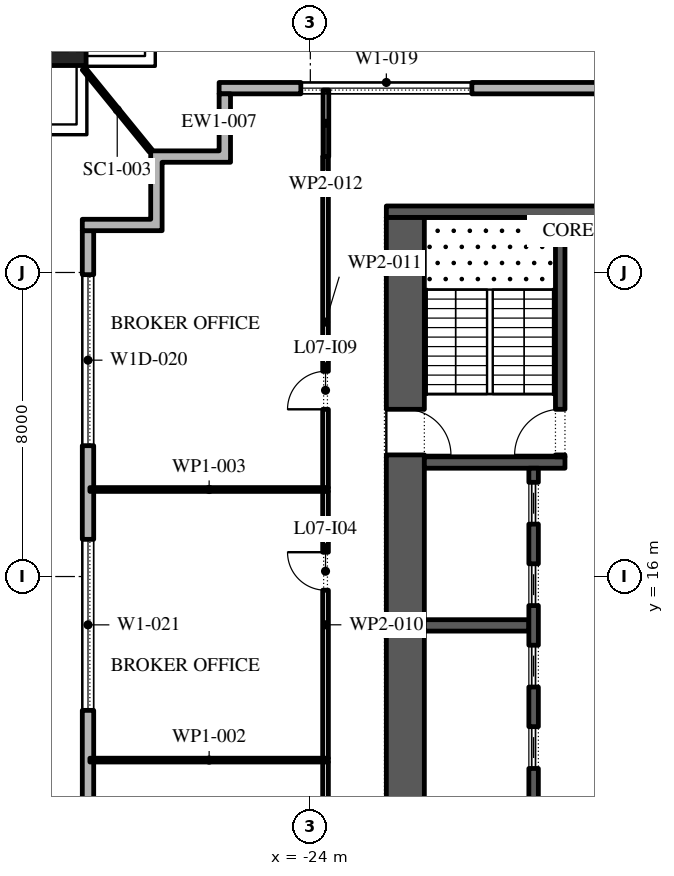
"""IFC4 building model, lengths in metres.
Left out: names, types, materials, properties, quantities, classifications, styles, units other than length and angle.
Written with IfcOpenShell. Run it as: python <this file> out.ifc"""

import sys

from ifc_helpers import new_model, si_unit, direction, frame, frame_2d, origin, origin_2d, place, context, subcontext, project, spatial, polyline, rectangle, outline, extrude, element, fill, save


model = new_model("IFC4")
c1 = context("Model", 3, precision=1e-05, world=origin(), true_north=direction((0.0, 1.0)))
c2 = subcontext(c1, "Body", "Model", "MODEL_VIEW")
j1 = project(units=[si_unit("LENGTHUNIT", "METRE"), si_unit("PLANEANGLEUNIT", "RADIAN")], contexts=[c1])
p1 = place(None, origin())
s1 = spatial("IfcSite", under=j1, at=p1, CompositionType="ELEMENT")
p2 = place(p1, origin())
s2 = spatial("IfcBuilding", under=s1, at=p2, CompositionType="ELEMENT")
p3 = place(p2, frame((0.0, 0.0, 39.6)))
s3 = spatial("IfcBuildingStorey", under=s2, at=p3, CompositionType="ELEMENT", Elevation=39.6)
p4 = place(p3, frame((-30.6, 30.146, 0.0), z_axis=(0.0, 0.090540965689, 0.995892731941), x_axis=(-1.0, 0.0, 0.0)))
e1 = element("IfcColumn", 1, at=p4, inside=s3, PredefinedType="COLUMN", context=c2, shape_type="SweptSolid", body=[
    extrude(rectangle(XDim=1.4, YDim=1.4, at=origin_2d()), origin(), (0.0, 0.0, 1.0), 4.217),
])
p5 = place(p3, frame((26.1, 28.85, 0.0), z_axis=(0.0, 0.0, 1.0), x_axis=(-1.0, 0.0, 0.0)))
e2 = element("IfcWall", 2, at=p5, inside=s3, PredefinedType="STANDARD", context=c2, shape_type="SweptSolid", body=[
    extrude(rectangle(XDim=52.5, YDim=0.3, at=frame_2d((26.25, 0.0))), origin(), (0.0, 0.0, 1.0), 4.0),
])
p6 = place(p5, frame((2.0, 0.0, 0.45)))
e3 = element("IfcOpeningElement", 3, at=p6, cuts=e2, PredefinedType="OPENING", context=c2, shape_type="SweptSolid", body=[
    extrude(rectangle(XDim=4.5, YDim=3.05, at=frame_2d((2.25, 1.525))), frame((0.0, 0.16, 0.0), z_axis=(0.0, -1.0, 0.0), x_axis=(1.0, 0.0, 0.0)), (0.0, 0.0, 1.0), 0.32),
])
p7 = place(p5, frame((10.65, 0.0, 0.45)))
e4 = element("IfcOpeningElement", 4, at=p7, cuts=e2, PredefinedType="OPENING", context=c2, shape_type="SweptSolid", body=[
    extrude(rectangle(XDim=4.5, YDim=3.05, at=frame_2d((2.25, 1.525))), frame((0.0, 0.16, 0.0), z_axis=(0.0, -1.0, 0.0), x_axis=(1.0, 0.0, 0.0)), (0.0, 0.0, 1.0), 0.32),
])
p8 = place(p5, frame((20.5, 0.0, 0.0)))
e5 = element("IfcOpeningElement", 5, at=p8, cuts=e2, PredefinedType="OPENING", context=c2, shape_type="SweptSolid", body=[
    extrude(rectangle(XDim=2.4, YDim=3.5, at=frame_2d((1.2, 1.75))), frame((0.0, 0.16, 0.0), z_axis=(0.0, -1.0, 0.0), x_axis=(1.0, 0.0, 0.0)), (0.0, 0.0, 1.0), 0.32),
])
p9 = place(p5, frame((28.25, 0.0, 0.45)))
e6 = element("IfcOpeningElement", 6, at=p9, cuts=e2, PredefinedType="OPENING", context=c2, shape_type="SweptSolid", body=[
    extrude(rectangle(XDim=4.5, YDim=3.05, at=frame_2d((2.25, 1.525))), frame((0.0, 0.16, 0.0), z_axis=(0.0, -1.0, 0.0), x_axis=(1.0, 0.0, 0.0)), (0.0, 0.0, 1.0), 0.32),
])
p10 = place(p5, frame((37.05, 0.0, 0.45)))
e7 = element("IfcOpeningElement", 7, at=p10, cuts=e2, PredefinedType="OPENING", context=c2, shape_type="SweptSolid", body=[
    extrude(rectangle(XDim=4.5, YDim=3.05, at=frame_2d((2.25, 1.525))), frame((0.0, 0.16, 0.0), z_axis=(0.0, -1.0, 0.0), x_axis=(1.0, 0.0, 0.0)), (0.0, 0.0, 1.0), 0.32),
])
p11 = place(p5, frame((45.85, 0.0, 0.45)))
e8 = element("IfcOpeningElement", 8, at=p11, cuts=e2, PredefinedType="OPENING", context=c2, shape_type="SweptSolid", body=[
    extrude(rectangle(XDim=4.5, YDim=3.05, at=frame_2d((2.25, 1.525))), frame((0.0, 0.16, 0.0), z_axis=(0.0, -1.0, 0.0), x_axis=(1.0, 0.0, 0.0)), (0.0, 0.0, 1.0), 0.32),
])
p12 = place(p3, frame((-29.85, 25.1, 0.0), z_axis=(0.0, 0.0, 1.0), x_axis=(0.0, -1.0, 0.0)))
e9 = element("IfcWall", 9, at=p12, inside=s3, PredefinedType="STANDARD", context=c2, shape_type="SweptSolid", body=[
    extrude(rectangle(XDim=49.5, YDim=0.3, at=frame_2d((24.75, 0.0))), origin(), (0.0, 0.0, 1.0), 4.0),
])
p13 = place(p12, frame((1.157, 0.0, 0.45)))
e10 = element("IfcOpeningElement", 10, at=p13, cuts=e9, PredefinedType="OPENING", context=c2, shape_type="SweptSolid", body=[
    extrude(rectangle(XDim=4.5, YDim=2.875, at=frame_2d((2.25, 1.438))), frame((0.0, 0.16, 0.0), z_axis=(0.0, -1.0, 0.0), x_axis=(1.0, 0.0, 0.0)), (0.0, 0.0, 1.0), 0.32),
])
p14 = place(p12, frame((8.121, 0.0, 0.45)))
e11 = element("IfcOpeningElement", 11, at=p14, cuts=e9, PredefinedType="OPENING", context=c2, shape_type="SweptSolid", body=[
    extrude(rectangle(XDim=4.5, YDim=3.05, at=frame_2d((2.25, 1.525))), frame((0.0, 0.16, 0.0), z_axis=(0.0, -1.0, 0.0), x_axis=(1.0, 0.0, 0.0)), (0.0, 0.0, 1.0), 0.32),
])
p15 = place(p12, frame((16.286, 0.0, 0.0)))
e12 = element("IfcOpeningElement", 12, at=p15, cuts=e9, PredefinedType="OPENING", context=c2, shape_type="SweptSolid", body=[
    extrude(rectangle(XDim=2.4, YDim=3.325, at=frame_2d((1.2, 1.663))), frame((0.0, 0.16, 0.0), z_axis=(0.0, -1.0, 0.0), x_axis=(1.0, 0.0, 0.0)), (0.0, 0.0, 1.0), 0.32),
])
p16 = place(p12, frame((22.35, 0.0, 0.45)))
e13 = element("IfcOpeningElement", 13, at=p16, cuts=e9, PredefinedType="OPENING", context=c2, shape_type="SweptSolid", body=[
    extrude(rectangle(XDim=4.5, YDim=2.875, at=frame_2d((2.25, 1.438))), frame((0.0, 0.16, 0.0), z_axis=(0.0, -1.0, 0.0), x_axis=(1.0, 0.0, 0.0)), (0.0, 0.0, 1.0), 0.32),
])
p17 = place(p12, frame((29.464, 0.0, 0.45)))
e14 = element("IfcOpeningElement", 14, at=p17, cuts=e9, PredefinedType="OPENING", context=c2, shape_type="SweptSolid", body=[
    extrude(rectangle(XDim=4.5, YDim=2.875, at=frame_2d((2.25, 1.438))), frame((0.0, 0.16, 0.0), z_axis=(0.0, -1.0, 0.0), x_axis=(1.0, 0.0, 0.0)), (0.0, 0.0, 1.0), 0.32),
])
p18 = place(p12, frame((36.579, 0.0, 0.45)))
e15 = element("IfcOpeningElement", 15, at=p18, cuts=e9, PredefinedType="OPENING", context=c2, shape_type="SweptSolid", body=[
    extrude(rectangle(XDim=4.5, YDim=2.825, at=frame_2d((2.25, 1.413))), frame((0.0, 0.16, 0.0), z_axis=(0.0, -1.0, 0.0), x_axis=(1.0, 0.0, 0.0)), (0.0, 0.0, 1.0), 0.32),
])
p19 = place(p12, frame((44.743, 0.0, 0.0)))
e16 = element("IfcOpeningElement", 16, at=p19, cuts=e9, PredefinedType="OPENING", context=c2, shape_type="SweptSolid", body=[
    extrude(rectangle(XDim=2.4, YDim=3.5, at=frame_2d((1.2, 1.75))), frame((0.0, 0.16, 0.0), z_axis=(0.0, -1.0, 0.0), x_axis=(1.0, 0.0, 0.0)), (0.0, 0.0, 1.0), 0.32),
])
p20 = place(p3, origin())
e17 = element("IfcWall", 17, at=p20, inside=s3, PredefinedType="STANDARD", context=c2, shape_type="SweptSolid", body=[
    extrude(outline(polyline([(-28.2, 25.4), (-28.2, 27.2), (-26.4, 27.2), (-26.4, 28.7), (-26.1, 28.7), (-26.1, 26.9), (-27.9, 26.9), (-27.9, 25.1), (-30.0, 25.1), (-30.0, 25.4), (-28.2, 25.4)])), origin(), (0.0, 0.0, 1.0), 4.0),
])
p21 = place(p3, frame((-28.2, 27.2, -0.05), z_axis=(0.0, 0.0, 1.0), x_axis=(-0.631639832541, 0.775261969883, 0.0)))
e18 = element("IfcWall", 18, at=p21, inside=s3, PredefinedType="STANDARD", context=c2, shape_type="SweptSolid", body=[
    extrude(rectangle(XDim=2.79, YDim=0.1, at=frame_2d((1.395, 0.0))), origin(), (0.0, 0.0, 1.0), 4.05),
])
p22 = place(p3, frame((-21.5, -2.45, 0.0), z_axis=(0.0, 0.0, 1.0), x_axis=(0.0, 1.0, 0.0)))
e19 = element("IfcWall", 19, at=p22, inside=s3, PredefinedType="SHEAR", context=c2, shape_type="SweptSolid", body=[
    extrude(rectangle(XDim=27.9, YDim=1.0, at=frame_2d((13.95, 0.0))), origin(), (0.0, 0.0, 1.0), 4.0),
])
p23 = place(p22, frame((5.05, 0.0, 0.0)))
e20 = element("IfcOpeningElement", 20, at=p23, cuts=e19, PredefinedType="OPENING", context=c2, shape_type="SweptSolid", body=[
    extrude(rectangle(XDim=1.2, YDim=2.1, at=frame_2d((0.6, 1.05))), frame((0.0, 0.51, 0.0), z_axis=(0.0, -1.0, 0.0), x_axis=(1.0, 0.0, 0.0)), (0.0, 0.0, 1.0), 1.02),
])
p24 = place(p22, frame((21.65, 0.0, 0.0)))
e21 = element("IfcOpeningElement", 21, at=p24, cuts=e19, PredefinedType="OPENING", context=c2, shape_type="SweptSolid", body=[
    extrude(rectangle(XDim=1.2, YDim=2.1, at=frame_2d((0.6, 1.05))), frame((0.0, 0.51, 0.0), z_axis=(0.0, -1.0, 0.0), x_axis=(1.0, 0.0, 0.0)), (0.0, 0.0, 1.0), 1.02),
])
p25 = place(p3, frame((-22.0, 25.6, 0.0), z_axis=(0.0, 0.0, 1.0), x_axis=(1.0, 0.0, 0.0)))
e22 = element("IfcWall", 22, at=p25, inside=s3, PredefinedType="SHEAR", context=c2, shape_type="SweptSolid", body=[
    extrude(rectangle(XDim=12.0, YDim=0.3, at=frame_2d((6.0, 0.0))), origin(), (0.0, 0.0, 1.0), 4.0),
])
p26 = place(p3, frame((-21.0, 19.0, 0.0), z_axis=(0.0, 0.0, 1.0), x_axis=(1.0, 0.0, 0.0)))
e23 = element("IfcWall", 23, at=p26, inside=s3, PredefinedType="SHEAR", context=c2, shape_type="SweptSolid", body=[
    extrude(rectangle(XDim=3.7, YDim=0.3, at=frame_2d((1.85, 0.0))), origin(), (0.0, 0.0, 1.0), 4.0),
])
p27 = place(p3, frame((-17.425, 19.15, 0.0), z_axis=(0.0, 0.0, 1.0), x_axis=(0.0, 1.0, 0.0)))
e24 = element("IfcWall", 24, at=p27, inside=s3, PredefinedType="SHEAR", context=c2, shape_type="SweptSolid", body=[
    extrude(rectangle(XDim=6.3, YDim=0.25, at=frame_2d((3.15, 0.0))), origin(), (0.0, 0.0, 1.0), 4.0),
])
p28 = place(p27, frame((0.05, 0.0, 0.0)))
e25 = element("IfcOpeningElement", 25, at=p28, cuts=e24, PredefinedType="OPENING", context=c2, shape_type="SweptSolid", body=[
    extrude(rectangle(XDim=1.2, YDim=2.1, at=frame_2d((0.6, 1.05))), frame((0.0, 0.135, 0.0), z_axis=(0.0, -1.0, 0.0), x_axis=(1.0, 0.0, 0.0)), (0.0, 0.0, 1.0), 0.27),
])
p29 = place(p3, frame((-21.0, 14.714, 0.0), z_axis=(0.0, 0.0, 1.0), x_axis=(1.0, 0.0, 0.0)))
e26 = element("IfcWall", 26, at=p29, inside=s3, PredefinedType="SHEAR", context=c2, shape_type="SweptSolid", body=[
    extrude(rectangle(XDim=2.75, YDim=0.3, at=frame_2d((1.375, 0.0))), origin(), (0.0, 0.0, 1.0), 4.0),
])
p30 = place(p3, frame((-18.125, 4.15, 0.0), z_axis=(0.0, 0.0, 1.0), x_axis=(0.0, 1.0, 0.0)))
e27 = element("IfcWall", 27, at=p30, inside=s3, PredefinedType="SHEAR", context=c2, shape_type="SweptSolid", body=[
    extrude(rectangle(XDim=14.7, YDim=0.25, at=frame_2d((7.35, 0.0))), origin(), (0.0, 0.0, 1.0), 4.0),
])
p31 = place(p30, frame((0.371, 0.0, 0.0)))
e28 = element("IfcOpeningElement", 28, at=p31, cuts=e27, PredefinedType="OPENING", context=c2, shape_type="SweptSolid", body=[
    extrude(rectangle(XDim=1.1, YDim=2.1, at=frame_2d((0.55, 1.05))), frame((0.0, 0.135, 0.0), z_axis=(0.0, -1.0, 0.0), x_axis=(1.0, 0.0, 0.0)), (0.0, 0.0, 1.0), 0.27),
])
p32 = place(p30, frame((2.514, 0.0, 0.0)))
e29 = element("IfcOpeningElement", 29, at=p32, cuts=e27, PredefinedType="OPENING", context=c2, shape_type="SweptSolid", body=[
    extrude(rectangle(XDim=1.1, YDim=2.1, at=frame_2d((0.55, 1.05))), frame((0.0, 0.135, 0.0), z_axis=(0.0, -1.0, 0.0), x_axis=(1.0, 0.0, 0.0)), (0.0, 0.0, 1.0), 0.27),
])
p33 = place(p30, frame((4.657, 0.0, 0.0)))
e30 = element("IfcOpeningElement", 30, at=p33, cuts=e27, PredefinedType="OPENING", context=c2, shape_type="SweptSolid", body=[
    extrude(rectangle(XDim=1.1, YDim=2.1, at=frame_2d((0.55, 1.05))), frame((0.0, 0.135, 0.0), z_axis=(0.0, -1.0, 0.0), x_axis=(1.0, 0.0, 0.0)), (0.0, 0.0, 1.0), 0.27),
])
p34 = place(p30, frame((6.8, 0.0, 0.0)))
e31 = element("IfcOpeningElement", 31, at=p34, cuts=e27, PredefinedType="OPENING", context=c2, shape_type="SweptSolid", body=[
    extrude(rectangle(XDim=1.1, YDim=2.1, at=frame_2d((0.55, 1.05))), frame((0.0, 0.135, 0.0), z_axis=(0.0, -1.0, 0.0), x_axis=(1.0, 0.0, 0.0)), (0.0, 0.0, 1.0), 0.27),
])
p35 = place(p30, frame((8.943, 0.0, 0.0)))
e32 = element("IfcOpeningElement", 32, at=p35, cuts=e27, PredefinedType="OPENING", context=c2, shape_type="SweptSolid", body=[
    extrude(rectangle(XDim=1.1, YDim=2.1, at=frame_2d((0.55, 1.05))), frame((0.0, 0.135, 0.0), z_axis=(0.0, -1.0, 0.0), x_axis=(1.0, 0.0, 0.0)), (0.0, 0.0, 1.0), 0.27),
])
p36 = place(p30, frame((11.086, 0.0, 0.0)))
e33 = element("IfcOpeningElement", 33, at=p36, cuts=e27, PredefinedType="OPENING", context=c2, shape_type="SweptSolid", body=[
    extrude(rectangle(XDim=1.1, YDim=2.1, at=frame_2d((0.55, 1.05))), frame((0.0, 0.135, 0.0), z_axis=(0.0, -1.0, 0.0), x_axis=(1.0, 0.0, 0.0)), (0.0, 0.0, 1.0), 0.27),
])
p37 = place(p30, frame((13.229, 0.0, 0.0)))
e34 = element("IfcOpeningElement", 34, at=p37, cuts=e27, PredefinedType="OPENING", context=c2, shape_type="SweptSolid", body=[
    extrude(rectangle(XDim=1.1, YDim=2.1, at=frame_2d((0.55, 1.05))), frame((0.0, 0.135, 0.0), z_axis=(0.0, -1.0, 0.0), x_axis=(1.0, 0.0, 0.0)), (0.0, 0.0, 1.0), 0.27),
])
for number, where, z_axis, x_axis in (
    (35, (-29.8, 11.17, 0.0), (0.0, 0.0, 1.0), (1.0, 0.0, 0.0)),
    (36, (-29.8, 18.29, 0.0), (0.0, 0.0, 1.0), (1.0, 0.0, 0.0)),
):
    element("IfcWall", number, at=place(p3, frame(where, z_axis=z_axis, x_axis=x_axis)), inside=s3, PredefinedType="PARTITIONING", context=c2, shape_type="SweptSolid", body=[
        extrude(rectangle(XDim=6.275, YDim=0.1, at=frame_2d((3.138, 0.0))), origin(), (0.0, 0.0, 1.0), 4.0),
    ])
p38 = place(p3, frame((-23.6, -3.01, 0.0), z_axis=(0.0, 0.0, 1.0), x_axis=(0.0, 1.0, 0.0)))
e37 = element("IfcWall", 37, at=p38, inside=s3, PredefinedType="PARTITIONING", context=c2, shape_type="SweptSolid", body=[
    extrude(rectangle(XDim=14.13, YDim=0.15, at=frame_2d((7.065, 0.0))), origin(), (0.0, 0.0, 1.0), 4.0),
])
p39 = place(p38, frame((6.53, 0.0, 0.0)))
e38 = element("IfcOpeningElement", 38, at=p39, cuts=e37, PredefinedType="OPENING", context=c2, shape_type="SweptSolid", body=[
    extrude(rectangle(XDim=1.0, YDim=2.1, at=frame_2d((0.5, 1.05))), frame((0.0, 0.085, 0.0), z_axis=(0.0, -1.0, 0.0), x_axis=(1.0, 0.0, 0.0)), (0.0, 0.0, 1.0), 0.17),
])
p40 = place(p3, frame((-23.6, 11.22, 0.0), z_axis=(0.0, 0.0, 1.0), x_axis=(0.0, 1.0, 0.0)))
e39 = element("IfcWall", 39, at=p40, inside=s3, PredefinedType="PARTITIONING", context=c2, shape_type="SweptSolid", body=[
    extrude(rectangle(XDim=7.02, YDim=0.15, at=frame_2d((3.51, 0.0))), origin(), (0.0, 0.0, 1.0), 4.0),
])
p41 = place(p40, frame((4.42, 0.0, 0.0)))
e40 = element("IfcOpeningElement", 40, at=p41, cuts=e39, PredefinedType="OPENING", context=c2, shape_type="SweptSolid", body=[
    extrude(rectangle(XDim=1.0, YDim=2.1, at=frame_2d((0.5, 1.05))), frame((0.0, 0.085, 0.0), z_axis=(0.0, -1.0, 0.0), x_axis=(1.0, 0.0, 0.0)), (0.0, 0.0, 1.0), 0.17),
])
p42 = place(p3, frame((-23.6, 18.34, 0.0), z_axis=(0.0, 0.0, 1.0), x_axis=(0.0, 1.0, 0.0)))
e41 = element("IfcWall", 41, at=p42, inside=s3, PredefinedType="PARTITIONING", context=c2, shape_type="SweptSolid", body=[
    extrude(rectangle(XDim=8.71, YDim=0.15, at=frame_2d((4.355, 0.0))), origin(), (0.0, 0.0, 1.0), 4.0),
])
p43 = place(p42, frame((2.06, 0.0, 0.0)))
e42 = element("IfcOpeningElement", 42, at=p43, cuts=e41, PredefinedType="OPENING", context=c2, shape_type="SweptSolid", body=[
    extrude(rectangle(XDim=1.0, YDim=2.1, at=frame_2d((0.5, 1.05))), frame((0.0, 0.085, 0.0), z_axis=(0.0, -1.0, 0.0), x_axis=(1.0, 0.0, 0.0)), (0.0, 0.0, 1.0), 0.17),
])
p44 = place(p3, frame((-23.59, 27.05, 0.0), z_axis=(0.0, 0.0, 1.0), x_axis=(0.0, 1.0, 0.0)))
e43 = element("IfcWall", 43, at=p44, inside=s3, PredefinedType="PARTITIONING", context=c2, shape_type="SweptSolid", body=[
    extrude(rectangle(XDim=1.75, YDim=0.15, at=frame_2d((0.875, 0.0))), origin(), (0.0, 0.0, 1.0), 4.0),
])
p45 = place(p11, origin())
e44 = element("IfcWindow", 44, at=p45, inside=s3, PartitioningType="DOUBLE_PANEL_VERTICAL", PredefinedType="WINDOW", context=c2, shape_type="SweptSolid", body=[
    extrude(rectangle(XDim=4.5, YDim=3.05, at=frame_2d((2.25, 1.525))), frame((0.0, 0.03, 0.0), z_axis=(0.0, -1.0, 0.0), x_axis=(1.0, 0.0, 0.0)), (0.0, 0.0, 1.0), 0.06),
])
fill(e8, e44)
p46 = place(p13, origin())
e45 = element("IfcWindow", 45, at=p46, inside=s3, PartitioningType="DOUBLE_PANEL_VERTICAL", PredefinedType="WINDOW", context=c2, shape_type="SweptSolid", body=[
    extrude(rectangle(XDim=4.5, YDim=2.875, at=frame_2d((2.25, 1.438))), frame((0.0, 0.03, 0.0), z_axis=(0.0, -1.0, 0.0), x_axis=(1.0, 0.0, 0.0)), (0.0, 0.0, 1.0), 0.06),
])
fill(e10, e45)
p47 = place(p14, origin())
e46 = element("IfcWindow", 46, at=p47, inside=s3, PartitioningType="DOUBLE_PANEL_VERTICAL", PredefinedType="WINDOW", context=c2, shape_type="SweptSolid", body=[
    extrude(rectangle(XDim=4.5, YDim=3.05, at=frame_2d((2.25, 1.525))), frame((0.0, 0.03, 0.0), z_axis=(0.0, -1.0, 0.0), x_axis=(1.0, 0.0, 0.0)), (0.0, 0.0, 1.0), 0.06),
])
fill(e11, e46)
p48 = place(p34, origin())
e47 = element("IfcDoor", 47, at=p48, inside=s3, OperationType="SLIDING_TO_LEFT", PredefinedType="DOOR", context=c2, shape_type="SweptSolid", body=[
    extrude(rectangle(XDim=1.1, YDim=2.1, at=frame_2d((0.55, 1.05))), frame((0.0, 0.025, 0.0), z_axis=(0.0, -1.0, 0.0), x_axis=(1.0, 0.0, 0.0)), (0.0, 0.0, 1.0), 0.05),
])
fill(e31, e47)
p49 = place(p35, origin())
e48 = element("IfcDoor", 48, at=p49, inside=s3, OperationType="SLIDING_TO_LEFT", PredefinedType="DOOR", context=c2, shape_type="SweptSolid", body=[
    extrude(rectangle(XDim=1.1, YDim=2.1, at=frame_2d((0.55, 1.05))), frame((0.0, 0.025, 0.0), z_axis=(0.0, -1.0, 0.0), x_axis=(1.0, 0.0, 0.0)), (0.0, 0.0, 1.0), 0.05),
])
fill(e32, e48)
p50 = place(p36, origin())
e49 = element("IfcDoor", 49, at=p50, inside=s3, OperationType="SLIDING_TO_LEFT", PredefinedType="DOOR", context=c2, shape_type="SweptSolid", body=[
    extrude(rectangle(XDim=1.1, YDim=2.1, at=frame_2d((0.55, 1.05))), frame((0.0, 0.025, 0.0), z_axis=(0.0, -1.0, 0.0), x_axis=(1.0, 0.0, 0.0)), (0.0, 0.0, 1.0), 0.05),
])
fill(e33, e49)
p51 = place(p37, origin())
e50 = element("IfcDoor", 50, at=p51, inside=s3, OperationType="SLIDING_TO_LEFT", PredefinedType="DOOR", context=c2, shape_type="SweptSolid", body=[
    extrude(rectangle(XDim=1.1, YDim=2.1, at=frame_2d((0.55, 1.05))), frame((0.0, 0.025, 0.0), z_axis=(0.0, -1.0, 0.0), x_axis=(1.0, 0.0, 0.0)), (0.0, 0.0, 1.0), 0.05),
])
fill(e34, e50)
p52 = place(p28, origin())
e51 = element("IfcDoor", 51, at=p52, inside=s3, OperationType="SINGLE_SWING_RIGHT", PredefinedType="DOOR", context=c2, shape_type="SweptSolid", body=[
    extrude(rectangle(XDim=1.2, YDim=2.1, at=frame_2d((0.6, 1.05))), frame((0.0, 0.025, 0.0), z_axis=(0.0, -1.0, 0.0), x_axis=(1.0, 0.0, 0.0)), (0.0, 0.0, 1.0), 0.05),
])
fill(e25, e51)
p53 = place(p24, frame((1.2, 0.0, 0.0), z_axis=(0.0, 0.0, 1.0), x_axis=(-1.0, 0.0, 0.0)))
e52 = element("IfcDoor", 52, at=p53, inside=s3, OperationType="SINGLE_SWING_LEFT", PredefinedType="DOOR", context=c2, shape_type="SweptSolid", body=[
    extrude(rectangle(XDim=1.2, YDim=2.1, at=frame_2d((0.6, 1.05))), frame((0.0, 0.025, 0.0), z_axis=(0.0, -1.0, 0.0), x_axis=(1.0, 0.0, 0.0)), (0.0, 0.0, 1.0), 0.05),
])
fill(e21, e52)
p54 = place(p41, origin())
e53 = element("IfcDoor", 53, at=p54, inside=s3, OperationType="SINGLE_SWING_LEFT", PredefinedType="DOOR", context=c2, shape_type="SweptSolid", body=[
    extrude(rectangle(XDim=1.0, YDim=2.1, at=frame_2d((0.5, 1.05))), frame((0.0, 0.025, 0.0), z_axis=(0.0, -1.0, 0.0), x_axis=(1.0, 0.0, 0.0)), (0.0, 0.0, 1.0), 0.05),
])
fill(e40, e53)
p55 = place(p43, origin())
e54 = element("IfcDoor", 54, at=p55, inside=s3, OperationType="SINGLE_SWING_RIGHT", PredefinedType="DOOR", context=c2, shape_type="SweptSolid", body=[
    extrude(rectangle(XDim=1.0, YDim=2.1, at=frame_2d((0.5, 1.05))), frame((0.0, 0.025, 0.0), z_axis=(0.0, -1.0, 0.0), x_axis=(1.0, 0.0, 0.0)), (0.0, 0.0, 1.0), 0.05),
])
fill(e42, e54)
save(model, sys.argv[1])
